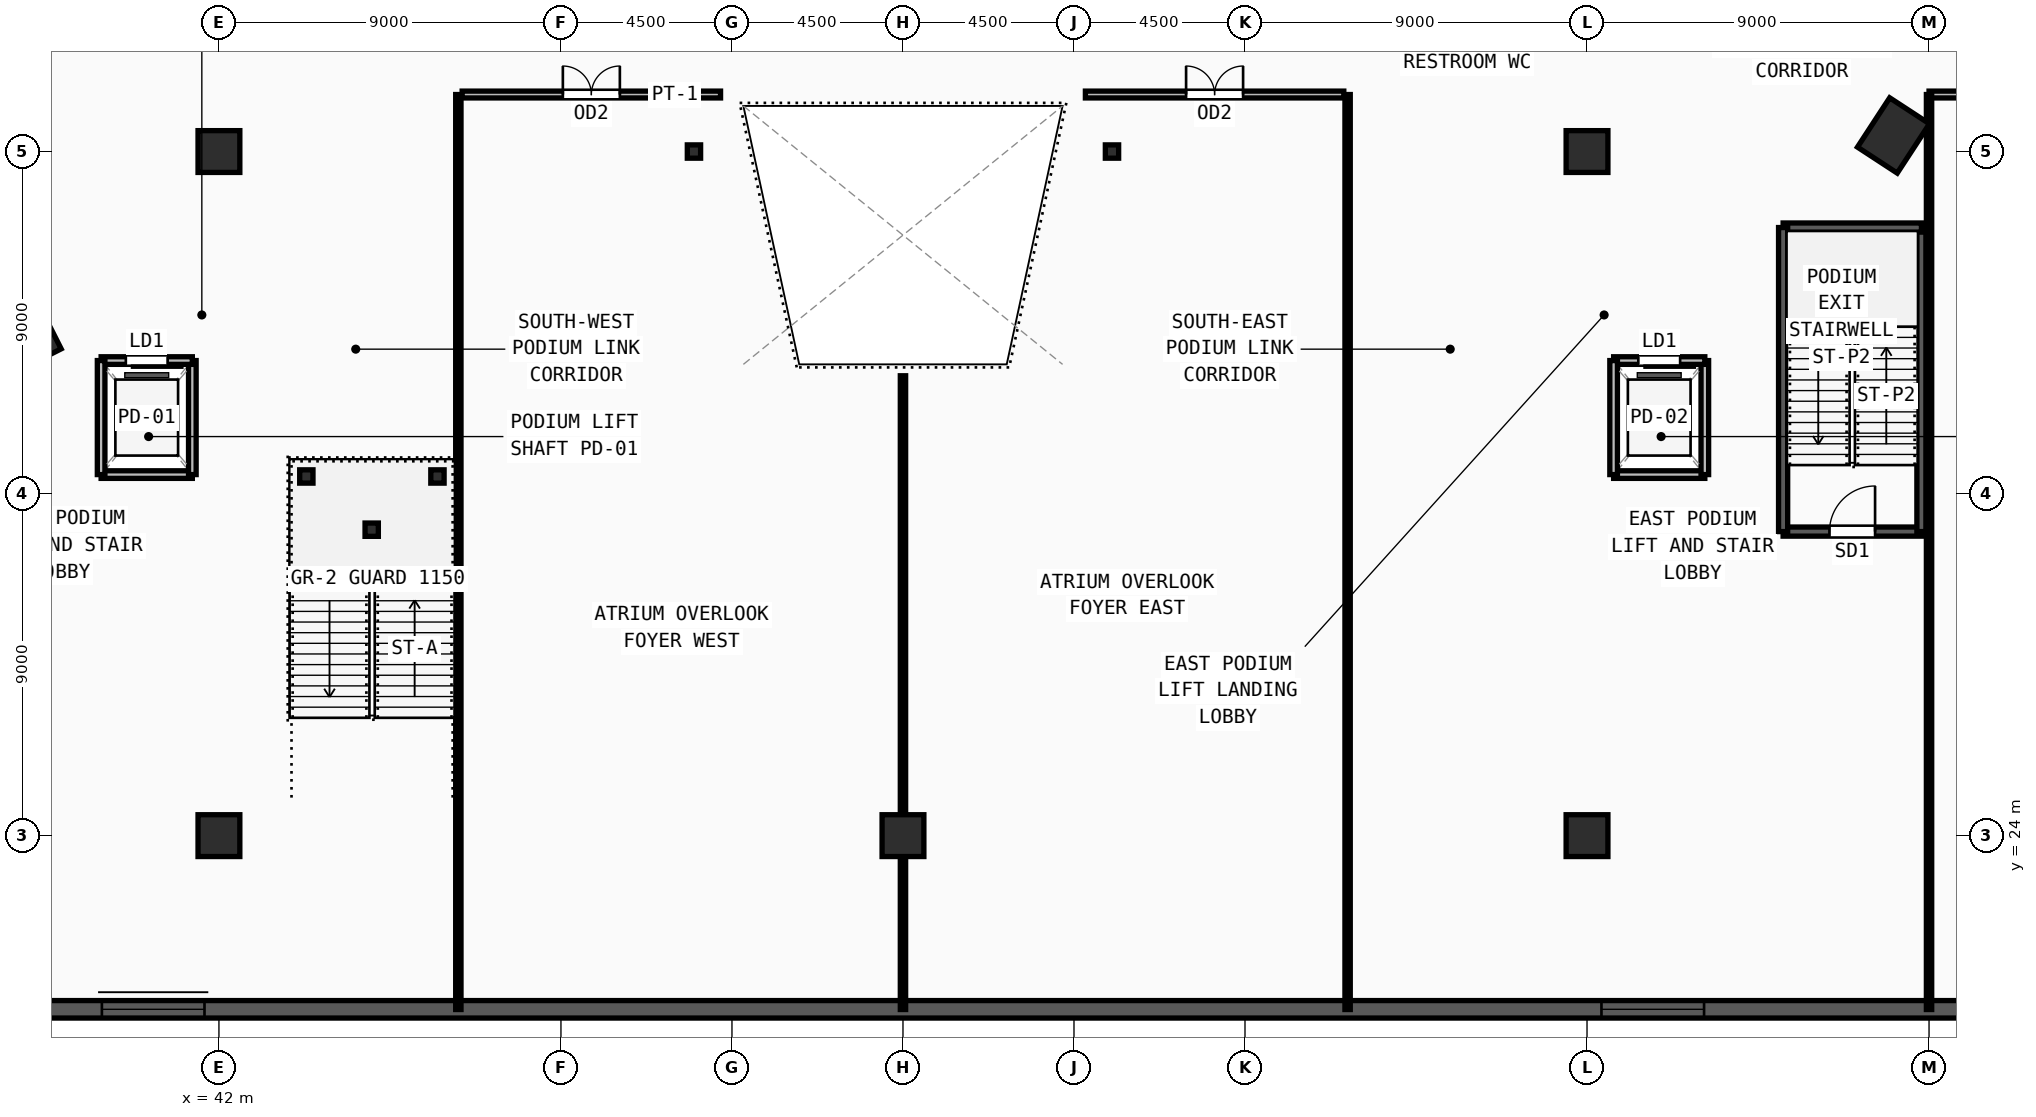
"""IFC4 building model, lengths in metres.
Left out: names, types, materials, properties, quantities, classifications, styles, units other than length and angle.
Written with IfcOpenShell. Run it as: python <this file> out.ifc"""

import sys

from ifc_helpers import new_model, si_unit, direction, frame, frame_2d, origin, origin_2d, place, context, subcontext, project, spatial, rectangle, i_section, extrude, source, transform, mapped, element, fill, save


model = new_model("IFC4")
c1 = context("Model", 3, precision=1e-05, world=origin(), true_north=direction((0.0, 1.0)))
c2 = subcontext(c1, "Body", "Model", "MODEL_VIEW")
j1 = project(units=[si_unit("LENGTHUNIT", "METRE"), si_unit("PLANEANGLEUNIT", "RADIAN")], contexts=[c1])
p1 = place(None, origin())
s1 = spatial("IfcSite", under=j1, at=p1, CompositionType="ELEMENT")
p2 = place(p1, origin())
s2 = spatial("IfcBuilding", under=s1, at=p2, CompositionType="ELEMENT")
p3 = place(p2, frame((0.0, 0.0, 14.4)))
s3 = spatial("IfcBuildingStorey", under=s2, at=p3, CompositionType="ELEMENT", Elevation=14.4)
m1 = source(origin(), c2, "Body", "SweptSolid", [
    extrude(rectangle(XDim=1.55, YDim=1.25, at=origin_2d()), origin(), (0.0, 0.0, 1.0), 4.5),
])
for number, where, z_axis, x_axis in (
    (1, (36.941, 37.217, 0.0), (0.0, 0.0, 1.0), (-0.452, 0.892, 0.0)),
    (2, (86.064, 42.423, 0.0), (0.0, 0.0, 1.0), (0.547, 0.837, 0.0)),
):
    element("IfcColumn", number, at=place(p3, frame(where, z_axis=z_axis, x_axis=x_axis)), inside=s3, PredefinedType="COLUMN", context=c2, shape_type="MappedRepresentation", body=[
        mapped(m1, transform((0.0, 0.0, 0.0), x_axis=(1.0, 0.0, 0.0), y_axis=(0.0, 1.0, 0.0), z_axis=(0.0, 0.0, 1.0), scale=1.0)),
    ])
m2 = source(origin(), c2, "Body", "SweptSolid", [
    extrude(rectangle(XDim=1.1, YDim=1.1, at=origin_2d()), origin(), (0.0, 0.0, 1.0), 4.5),
])
for number, where, z_axis, x_axis in (
    (3, (42.0, 24.0, 0.0), (0.0, 0.0, 1.0), (1.0, 0.0, 0.0)),
    (4, (60.0, 24.0, 0.0), (0.0, 0.0, 1.0), (1.0, 0.0, 0.0)),
    (5, (78.0, 24.0, 0.0), (0.0, 0.0, 1.0), (1.0, 0.0, 0.0)),
    (6, (42.0, 42.0, 0.0), (0.0, 0.0, 1.0), (1.0, 0.0, 0.0)),
    (7, (78.0, 42.0, 0.0), (0.0, 0.0, 1.0), (1.0, 0.0, 0.0)),
):
    element("IfcColumn", number, at=place(p3, frame(where, z_axis=z_axis, x_axis=x_axis)), inside=s3, PredefinedType="COLUMN", context=c2, shape_type="MappedRepresentation", body=[
        mapped(m2, transform((0.0, 0.0, 0.0), x_axis=(1.0, 0.0, 0.0), y_axis=(0.0, 1.0, 0.0), z_axis=(0.0, 0.0, 1.0), scale=1.0)),
    ])
m3 = source(origin(), c2, "Body", "SweptSolid", [
    extrude(i_section(OverallWidth=0.35, OverallDepth=0.35, WebThickness=0.012, FlangeThickness=0.019, at=origin_2d()), origin(), (0.0, 0.0, 1.0), 4.5),
])
for number, where, z_axis, x_axis in (
    (8, (54.5, 42.0, 0.0), (0.0, 0.0, 1.0), (1.0, 0.0, 0.0)),
    (9, (65.5, 42.0, 0.0), (0.0, 0.0, 1.0), (1.0, 0.0, 0.0)),
    (10, (44.3, 33.45, 0.0), (0.0, 0.0, 1.0), (1.0, 0.0, 0.0)),
    (11, (47.75, 33.45, 0.0), (0.0, 0.0, 1.0), (1.0, 0.0, 0.0)),
    (12, (46.02, 32.05, 0.0), (0.0, 0.0, 1.0), (1.0, 0.0, 0.0)),
):
    element("IfcColumn", number, at=place(p3, frame(where, z_axis=z_axis, x_axis=x_axis)), inside=s3, PredefinedType="COLUMN", context=c2, shape_type="MappedRepresentation", body=[
        mapped(m3, transform((0.0, 0.0, 0.0), x_axis=(1.0, 0.0, 0.0), y_axis=(0.0, 1.0, 0.0), z_axis=(0.0, 0.0, 1.0), scale=1.0)),
    ])
p4 = place(p3, frame((20.54, 19.43, 0.0), z_axis=(0.0, 0.0, 1.0), x_axis=(1.0, 0.0, 0.0)))
e13 = element("IfcWall", 13, at=p4, inside=s3, PredefinedType="SOLIDWALL", context=c2, shape_type="SweptSolid", body=[
    extrude(rectangle(XDim=78.92, YDim=0.46, at=frame_2d((39.46, 0.0))), origin(), (0.0, 0.0, 1.0), 4.25),
])
m4 = source(origin(), c2, "Body", "SweptSolid", [
    extrude(rectangle(XDim=2.7, YDim=2.35, at=frame_2d((1.35, 1.175))), frame((0.0, 0.24, 0.0), z_axis=(0.0, -1.0, 0.0), x_axis=(1.0, 0.0, 0.0)), (0.0, 0.0, 1.0), 0.48),
])
p5 = place(p4, frame((18.38, 0.0, 0.55)))
e14 = element("IfcOpeningElement", 14, at=p5, cuts=e13, PredefinedType="OPENING", context=c2, shape_type="MappedRepresentation", body=[
    mapped(m4, transform((0.0, 0.0, 0.0), x_axis=(1.0, 0.0, 0.0), y_axis=(0.0, 1.0, 0.0), z_axis=(0.0, 0.0, 1.0), scale=1.0)),
])
p6 = place(p4, frame((57.84, 0.0, 0.55)))
e15 = element("IfcOpeningElement", 15, at=p6, cuts=e13, PredefinedType="OPENING", context=c2, shape_type="MappedRepresentation", body=[
    mapped(m4, transform((0.0, 0.0, 0.0), x_axis=(1.0, 0.0, 0.0), y_axis=(0.0, 1.0, 0.0), z_axis=(0.0, 0.0, 1.0), scale=1.0)),
])
p7 = place(p4, frame((67.705, 0.0, 0.55)))
e16 = element("IfcOpeningElement", 16, at=p7, cuts=e13, PredefinedType="OPENING", context=c2, shape_type="MappedRepresentation", body=[
    mapped(m4, transform((0.0, 0.0, 0.0), x_axis=(1.0, 0.0, 0.0), y_axis=(0.0, 1.0, 0.0), z_axis=(0.0, 0.0, 1.0), scale=1.0)),
])
p8 = place(p3, frame((83.16, 32.0, 0.0), z_axis=(0.0, 0.0, 1.0), x_axis=(1.0, 0.0, 0.0)))
e17 = element("IfcWall", 17, at=p8, inside=s3, PredefinedType="SOLIDWALL", context=c2, shape_type="SweptSolid", body=[
    extrude(rectangle(XDim=3.64, YDim=0.24, at=frame_2d((1.82, 0.0))), origin(), (0.0, 0.0, 1.0), 4.25),
])
m5 = source(origin(), c2, "Body", "SweptSolid", [
    extrude(rectangle(XDim=1.2, YDim=2.2, at=frame_2d((0.6, 1.1))), frame((0.0, 0.13, 0.0), z_axis=(0.0, -1.0, 0.0), x_axis=(1.0, 0.0, 0.0)), (0.0, 0.0, 1.0), 0.26),
])
p9 = place(p8, frame((1.22, 0.0, 0.0)))
e18 = element("IfcOpeningElement", 18, at=p9, cuts=e17, PredefinedType="OPENING", context=c2, shape_type="MappedRepresentation", body=[
    mapped(m5, transform((0.0, 0.0, 0.0), x_axis=(1.0, 0.0, 0.0), y_axis=(0.0, 1.0, 0.0), z_axis=(0.0, 0.0, 1.0), scale=1.0)),
])
p10 = place(p3, frame((86.8, 32.0, 0.0), z_axis=(0.0, 0.0, 1.0), x_axis=(0.0, 1.0, 0.0)))
e19 = element("IfcWall", 19, at=p10, inside=s3, PredefinedType="SOLIDWALL", context=c2, shape_type="SweptSolid", body=[
    extrude(rectangle(XDim=8.0, YDim=0.24, at=frame_2d((4.0, 0.0))), origin(), (0.0, 0.0, 1.0), 4.25),
])
p11 = place(p3, frame((86.8, 40.0, 0.0), z_axis=(0.0, 0.0, 1.0), x_axis=(-1.0, 0.0, 0.0)))
e20 = element("IfcWall", 20, at=p11, inside=s3, PredefinedType="SOLIDWALL", context=c2, shape_type="SweptSolid", body=[
    extrude(rectangle(XDim=3.64, YDim=0.24, at=frame_2d((1.82, 0.0))), origin(), (0.0, 0.0, 1.0), 4.25),
])
p12 = place(p3, frame((83.16, 40.0, 0.0), z_axis=(0.0, 0.0, 1.0), x_axis=(0.0, -1.0, 0.0)))
e21 = element("IfcWall", 21, at=p12, inside=s3, PredefinedType="SOLIDWALL", context=c2, shape_type="SweptSolid", body=[
    extrude(rectangle(XDim=8.0, YDim=0.24, at=frame_2d((4.0, 0.0))), origin(), (0.0, 0.0, 1.0), 4.25),
])
p13 = place(p3, frame((38.9, 33.5, 0.0), z_axis=(0.0, 0.0, 1.0), x_axis=(1.0, 0.0, 0.0)))
e22 = element("IfcWall", 22, at=p13, inside=s3, PredefinedType="SOLIDWALL", context=c2, shape_type="SweptSolid", body=[
    extrude(rectangle(XDim=2.4, YDim=0.2, at=frame_2d((1.2, 0.0))), origin(), (0.0, 0.0, 1.0), 4.25),
])
p14 = place(p3, frame((41.3, 33.5, 0.0), z_axis=(0.0, 0.0, 1.0), x_axis=(0.0, 1.0, 0.0)))
e23 = element("IfcWall", 23, at=p14, inside=s3, PredefinedType="SOLIDWALL", context=c2, shape_type="SweptSolid", body=[
    extrude(rectangle(XDim=3.0, YDim=0.2, at=frame_2d((1.5, 0.0))), origin(), (0.0, 0.0, 1.0), 4.25),
])
p15 = place(p3, frame((41.3, 36.5, 0.0), z_axis=(0.0, 0.0, 1.0), x_axis=(-1.0, 0.0, 0.0)))
e24 = element("IfcWall", 24, at=p15, inside=s3, PredefinedType="SOLIDWALL", context=c2, shape_type="SweptSolid", body=[
    extrude(rectangle(XDim=2.4, YDim=0.2, at=frame_2d((1.2, 0.0))), origin(), (0.0, 0.0, 1.0), 4.25),
])
m6 = source(origin(), c2, "Body", "SweptSolid", [
    extrude(rectangle(XDim=1.1, YDim=2.2, at=frame_2d((0.55, 1.1))), frame((0.0, 0.11, 0.0), z_axis=(0.0, -1.0, 0.0), x_axis=(1.0, 0.0, 0.0)), (0.0, 0.0, 1.0), 0.22),
])
p16 = place(p15, frame((0.65, 0.0, 0.0)))
e25 = element("IfcOpeningElement", 25, at=p16, cuts=e24, PredefinedType="OPENING", context=c2, shape_type="MappedRepresentation", body=[
    mapped(m6, transform((0.0, 0.0, 0.0), x_axis=(1.0, 0.0, 0.0), y_axis=(0.0, 1.0, 0.0), z_axis=(0.0, 0.0, 1.0), scale=1.0)),
])
p17 = place(p3, frame((38.9, 36.5, 0.0), z_axis=(0.0, 0.0, 1.0), x_axis=(0.0, -1.0, 0.0)))
e26 = element("IfcWall", 26, at=p17, inside=s3, PredefinedType="SOLIDWALL", context=c2, shape_type="SweptSolid", body=[
    extrude(rectangle(XDim=3.0, YDim=0.2, at=frame_2d((1.5, 0.0))), origin(), (0.0, 0.0, 1.0), 4.25),
])
p18 = place(p3, frame((78.7, 33.5, 0.0), z_axis=(0.0, 0.0, 1.0), x_axis=(1.0, 0.0, 0.0)))
e27 = element("IfcWall", 27, at=p18, inside=s3, PredefinedType="SOLIDWALL", context=c2, shape_type="SweptSolid", body=[
    extrude(rectangle(XDim=2.4, YDim=0.2, at=frame_2d((1.2, 0.0))), origin(), (0.0, 0.0, 1.0), 4.25),
])
p19 = place(p3, frame((81.1, 33.5, 0.0), z_axis=(0.0, 0.0, 1.0), x_axis=(0.0, 1.0, 0.0)))
e28 = element("IfcWall", 28, at=p19, inside=s3, PredefinedType="SOLIDWALL", context=c2, shape_type="SweptSolid", body=[
    extrude(rectangle(XDim=3.0, YDim=0.2, at=frame_2d((1.5, 0.0))), origin(), (0.0, 0.0, 1.0), 4.25),
])
p20 = place(p3, frame((81.1, 36.5, 0.0), z_axis=(0.0, 0.0, 1.0), x_axis=(-1.0, 0.0, 0.0)))
e29 = element("IfcWall", 29, at=p20, inside=s3, PredefinedType="SOLIDWALL", context=c2, shape_type="SweptSolid", body=[
    extrude(rectangle(XDim=2.4, YDim=0.2, at=frame_2d((1.2, 0.0))), origin(), (0.0, 0.0, 1.0), 4.25),
])
p21 = place(p20, frame((0.65, 0.0, 0.0)))
e30 = element("IfcOpeningElement", 30, at=p21, cuts=e29, PredefinedType="OPENING", context=c2, shape_type="MappedRepresentation", body=[
    mapped(m6, transform((0.0, 0.0, 0.0), x_axis=(1.0, 0.0, 0.0), y_axis=(0.0, 1.0, 0.0), z_axis=(0.0, 0.0, 1.0), scale=1.0)),
])
p22 = place(p3, frame((78.7, 36.5, 0.0), z_axis=(0.0, 0.0, 1.0), x_axis=(0.0, -1.0, 0.0)))
e31 = element("IfcWall", 31, at=p22, inside=s3, PredefinedType="SOLIDWALL", context=c2, shape_type="SweptSolid", body=[
    extrude(rectangle(XDim=3.0, YDim=0.2, at=frame_2d((1.5, 0.0))), origin(), (0.0, 0.0, 1.0), 4.25),
])
p23 = place(p3, frame((48.4, 43.5, 0.0), z_axis=(0.0, 0.0, 1.0), x_axis=(1.0, 0.0, 0.0)))
e32 = element("IfcWall", 32, at=p23, inside=s3, PredefinedType="PARTITIONING", context=c2, shape_type="SweptSolid", body=[
    extrude(rectangle(XDim=6.8, YDim=0.18, at=frame_2d((3.4, 0.0))), origin(), (0.0, 0.0, 1.0), 4.25),
])
m7 = source(origin(), c2, "Body", "SweptSolid", [
    extrude(rectangle(XDim=1.5, YDim=2.2, at=frame_2d((0.75, 1.1))), frame((0.0, 0.1, 0.0), z_axis=(0.0, -1.0, 0.0), x_axis=(1.0, 0.0, 0.0)), (0.0, 0.0, 1.0), 0.2),
])
p24 = place(p23, frame((2.65, 0.0, 0.0)))
e33 = element("IfcOpeningElement", 33, at=p24, cuts=e32, PredefinedType="OPENING", context=c2, shape_type="MappedRepresentation", body=[
    mapped(m7, transform((0.0, 0.0, 0.0), x_axis=(1.0, 0.0, 0.0), y_axis=(0.0, 1.0, 0.0), z_axis=(0.0, 0.0, 1.0), scale=1.0)),
])
p25 = place(p3, frame((64.8, 43.5, 0.0), z_axis=(0.0, 0.0, 1.0), x_axis=(1.0, 0.0, 0.0)))
e34 = element("IfcWall", 34, at=p25, inside=s3, PredefinedType="PARTITIONING", context=c2, shape_type="SweptSolid", body=[
    extrude(rectangle(XDim=6.8, YDim=0.18, at=frame_2d((3.4, 0.0))), origin(), (0.0, 0.0, 1.0), 4.25),
])
p26 = place(p25, frame((2.65, 0.0, 0.0)))
e35 = element("IfcOpeningElement", 35, at=p26, cuts=e34, PredefinedType="OPENING", context=c2, shape_type="MappedRepresentation", body=[
    mapped(m7, transform((0.0, 0.0, 0.0), x_axis=(1.0, 0.0, 0.0), y_axis=(0.0, 1.0, 0.0), z_axis=(0.0, 0.0, 1.0), scale=1.0)),
])
p27 = place(p3, frame((87.0, 43.5, 0.0), z_axis=(0.0, 0.0, 1.0), x_axis=(1.0, 0.0, 0.0)))
e36 = element("IfcWall", 36, at=p27, inside=s3, PredefinedType="PARTITIONING", context=c2, shape_type="SweptSolid", body=[
    extrude(rectangle(XDim=13.575, YDim=0.18, at=frame_2d((6.788, 0.0))), origin(), (0.0, 0.0, 1.0), 4.25),
])
p28 = place(p27, frame((6.038, 0.0, 0.0)))
e37 = element("IfcOpeningElement", 37, at=p28, cuts=e36, PredefinedType="OPENING", context=c2, shape_type="MappedRepresentation", body=[
    mapped(m7, transform((0.0, 0.0, 0.0), x_axis=(1.0, 0.0, 0.0), y_axis=(0.0, 1.0, 0.0), z_axis=(0.0, 0.0, 1.0), scale=1.0)),
])
for number, where, z_axis, x_axis in (
    (38, (87.0, 19.425, 0.0), (0.0, 0.0, 1.0), (0.0, 1.0, 0.0)),
    (39, (48.3, 19.425, 0.0), (0.0, 0.0, 1.0), (0.0, 1.0, 0.0)),
    (40, (71.7, 19.425, 0.0), (0.0, 0.0, 1.0), (0.0, 1.0, 0.0)),
):
    element("IfcWall", number, at=place(p3, frame(where, z_axis=z_axis, x_axis=x_axis)), inside=s3, PredefinedType="PARTITIONING", context=c2, shape_type="SweptSolid", body=[
        extrude(rectangle(XDim=24.075, YDim=0.14, at=frame_2d((12.038, 0.0))), origin(), (0.0, 0.0, 1.0), 4.25),
    ])
p29 = place(p3, frame((60.0, 19.425, 0.0), z_axis=(0.0, 0.0, 1.0), x_axis=(0.0, 1.0, 0.0)))
e41 = element("IfcWall", 41, at=p29, inside=s3, PredefinedType="PARTITIONING", context=c2, shape_type="SweptSolid", body=[
    extrude(rectangle(XDim=16.675, YDim=0.14, at=frame_2d((8.337, 0.0))), origin(), (0.0, 0.0, 1.0), 4.25),
])
m8 = source(origin(), c2, "Body", "SweptSolid", [
    extrude(rectangle(XDim=2.7, YDim=2.35, at=frame_2d((1.35, 1.175))), frame((0.0, 0.03, 0.0), z_axis=(0.0, -1.0, 0.0), x_axis=(1.0, 0.0, 0.0)), (0.0, 0.0, 1.0), 0.06),
])
p30 = place(p5, origin())
e42 = element("IfcWindow", 42, at=p30, inside=s3, PartitioningType="TRIPLE_PANEL_VERTICAL", PredefinedType="WINDOW", context=c2, shape_type="MappedRepresentation", body=[
    mapped(m8, transform((0.0, 0.0, 0.0), x_axis=(1.0, 0.0, 0.0), y_axis=(0.0, 1.0, 0.0), z_axis=(0.0, 0.0, 1.0), scale=1.0)),
])
fill(e14, e42)
p31 = place(p6, origin())
e43 = element("IfcWindow", 43, at=p31, inside=s3, PartitioningType="TRIPLE_PANEL_VERTICAL", PredefinedType="WINDOW", context=c2, shape_type="MappedRepresentation", body=[
    mapped(m8, transform((0.0, 0.0, 0.0), x_axis=(1.0, 0.0, 0.0), y_axis=(0.0, 1.0, 0.0), z_axis=(0.0, 0.0, 1.0), scale=1.0)),
])
fill(e15, e43)
m9 = source(origin(), c2, "Body", "SweptSolid", [
    extrude(rectangle(XDim=1.2, YDim=2.2, at=frame_2d((0.6, 1.1))), frame((0.0, 0.025, 0.0), z_axis=(0.0, -1.0, 0.0), x_axis=(1.0, 0.0, 0.0)), (0.0, 0.0, 1.0), 0.05),
])
p32 = place(p9, origin())
e44 = element("IfcDoor", 44, at=p32, inside=s3, OperationType="SINGLE_SWING_RIGHT", PredefinedType="DOOR", context=c2, shape_type="MappedRepresentation", body=[
    mapped(m9, transform((0.0, 0.0, 0.0), x_axis=(1.0, 0.0, 0.0), y_axis=(0.0, 1.0, 0.0), z_axis=(0.0, 0.0, 1.0), scale=1.0)),
])
fill(e18, e44)
m10 = source(origin(), c2, "Body", "SweptSolid", [
    extrude(rectangle(XDim=1.1, YDim=2.2, at=frame_2d((0.55, 1.1))), frame((0.0, 0.025, 0.0), z_axis=(0.0, -1.0, 0.0), x_axis=(1.0, 0.0, 0.0)), (0.0, 0.0, 1.0), 0.05),
])
p33 = place(p16, origin())
e45 = element("IfcDoor", 45, at=p33, inside=s3, OperationType="SLIDING_TO_LEFT", PredefinedType="DOOR", context=c2, shape_type="MappedRepresentation", body=[
    mapped(m10, transform((0.0, 0.0, 0.0), x_axis=(1.0, 0.0, 0.0), y_axis=(0.0, 1.0, 0.0), z_axis=(0.0, 0.0, 1.0), scale=1.0)),
])
fill(e25, e45)
p34 = place(p21, origin())
e46 = element("IfcDoor", 46, at=p34, inside=s3, OperationType="SLIDING_TO_LEFT", PredefinedType="DOOR", context=c2, shape_type="MappedRepresentation", body=[
    mapped(m10, transform((0.0, 0.0, 0.0), x_axis=(1.0, 0.0, 0.0), y_axis=(0.0, 1.0, 0.0), z_axis=(0.0, 0.0, 1.0), scale=1.0)),
])
fill(e30, e46)
m11 = source(origin(), c2, "Body", "SweptSolid", [
    extrude(rectangle(XDim=1.5, YDim=2.2, at=frame_2d((0.75, 1.1))), frame((0.0, 0.025, 0.0), z_axis=(0.0, -1.0, 0.0), x_axis=(1.0, 0.0, 0.0)), (0.0, 0.0, 1.0), 0.05),
])
p35 = place(p24, origin())
e47 = element("IfcDoor", 47, at=p35, inside=s3, OperationType="DOUBLE_DOOR_SINGLE_SWING", PredefinedType="DOOR", context=c2, shape_type="MappedRepresentation", body=[
    mapped(m11, transform((0.0, 0.0, 0.0), x_axis=(1.0, 0.0, 0.0), y_axis=(0.0, 1.0, 0.0), z_axis=(0.0, 0.0, 1.0), scale=1.0)),
])
fill(e33, e47)
p36 = place(p26, origin())
e48 = element("IfcDoor", 48, at=p36, inside=s3, OperationType="DOUBLE_DOOR_SINGLE_SWING", PredefinedType="DOOR", context=c2, shape_type="MappedRepresentation", body=[
    mapped(m11, transform((0.0, 0.0, 0.0), x_axis=(1.0, 0.0, 0.0), y_axis=(0.0, 1.0, 0.0), z_axis=(0.0, 0.0, 1.0), scale=1.0)),
])
fill(e35, e48)
save(model, sys.argv[1])
